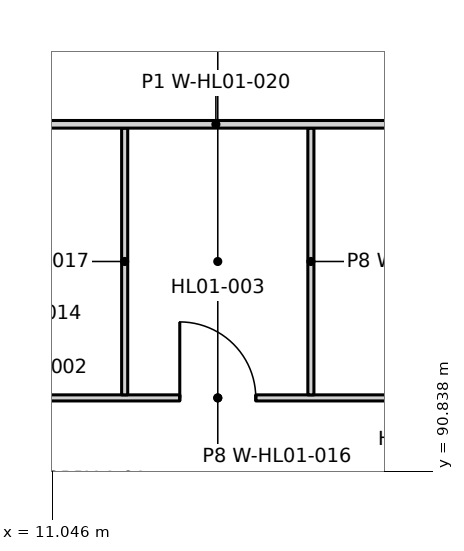
"""IFC4 building model, lengths in metres.
Left out: names, types, materials, properties, quantities, classifications, styles, units other than length and angle.
Written with IfcOpenShell. Run it as: python <this file> out.ifc"""

import sys

from ifc_helpers import new_model, si_unit, direction, frame, frame_2d, origin, place, context, subcontext, project, spatial, rectangle, extrude, element, fill, save


model = new_model("IFC4")
c1 = context("Model", 3, precision=1e-05, world=origin(), true_north=direction((0.0, 1.0)))
c2 = subcontext(c1, "Body", "Model", "MODEL_VIEW")
j1 = project(units=[si_unit("LENGTHUNIT", "METRE"), si_unit("PLANEANGLEUNIT", "RADIAN")], contexts=[c1])
p1 = place(None, origin())
s1 = spatial("IfcSite", under=j1, at=p1, CompositionType="ELEMENT")
p2 = place(p1, origin())
s2 = spatial("IfcBuilding", under=s1, at=p2, CompositionType="ELEMENT")
p3 = place(p2, frame((0.0, 0.0, 6.0)))
s3 = spatial("IfcBuildingStorey", under=s2, at=p3, CompositionType="ELEMENT", Elevation=6.0)
p4 = place(p3, frame((9.05, 91.8, 0.0), z_axis=(0.0, 0.0, 1.0), x_axis=(1.0, 0.0, 0.0)))
e1 = element("IfcWall", 1, at=p4, inside=s3, PredefinedType="PARTITIONING", context=c2, shape_type="SweptSolid", body=[
    extrude(rectangle(XDim=8.35, YDim=0.08, at=frame_2d((4.175, 0.0))), origin(), (0.0, 0.0, 1.0), 4.2),
])
p5 = place(p4, frame((0.95, 0.0, 0.0)))
e2 = element("IfcOpeningElement", 2, at=p5, cuts=e1, PredefinedType="OPENING", context=c2, shape_type="SweptSolid", body=[
    extrude(rectangle(XDim=1.0, YDim=2.1, at=frame_2d((0.5, 1.05))), frame((0.0, 0.05, 0.0), z_axis=(0.0, -1.0, 0.0), x_axis=(1.0, 0.0, 0.0)), (0.0, 0.0, 1.0), 0.1),
])
p6 = place(p4, frame((3.675, 0.0, 0.0)))
e3 = element("IfcOpeningElement", 3, at=p6, cuts=e1, PredefinedType="OPENING", context=c2, shape_type="SweptSolid", body=[
    extrude(rectangle(XDim=1.0, YDim=2.1, at=frame_2d((0.5, 1.05))), frame((0.0, 0.05, 0.0), z_axis=(0.0, -1.0, 0.0), x_axis=(1.0, 0.0, 0.0)), (0.0, 0.0, 1.0), 0.1),
])
p7 = place(p4, frame((6.4, 0.0, 0.0)))
e4 = element("IfcOpeningElement", 4, at=p7, cuts=e1, PredefinedType="OPENING", context=c2, shape_type="SweptSolid", body=[
    extrude(rectangle(XDim=1.0, YDim=2.1, at=frame_2d((0.5, 1.05))), frame((0.0, 0.05, 0.0), z_axis=(0.0, -1.0, 0.0), x_axis=(1.0, 0.0, 0.0)), (0.0, 0.0, 1.0), 0.1),
])
for number, where, z_axis, x_axis in (
    (5, (12.0, 91.84, 0.0), (0.0, 0.0, 1.0), (0.0, 1.0, 0.0)),
    (6, (14.45, 91.84, 0.0), (0.0, 0.0, 1.0), (0.0, 1.0, 0.0)),
):
    element("IfcWall", number, at=place(p3, frame(where, z_axis=z_axis, x_axis=x_axis)), inside=s3, PredefinedType="PARTITIONING", context=c2, shape_type="SweptSolid", body=[
        extrude(rectangle(XDim=3.51, YDim=0.08, at=frame_2d((1.755, 0.0))), origin(), (0.0, 0.0, 1.0), 4.2),
    ])
p8 = place(p3, frame((8.95, 95.4, 0.0), z_axis=(0.0, 0.0, 1.0), x_axis=(1.0, 0.0, 0.0)))
e7 = element("IfcWall", 7, at=p8, inside=s3, PredefinedType="PARTITIONING", context=c2, shape_type="SweptSolid", body=[
    extrude(rectangle(XDim=8.5, YDim=0.1, at=frame_2d((4.25, 0.0))), origin(), (0.0, 0.0, 1.0), 4.2),
])
p9 = place(p6, origin())
e8 = element("IfcDoor", 8, at=p9, inside=s3, OperationType="SINGLE_SWING_LEFT", PredefinedType="DOOR", context=c2, shape_type="SweptSolid", body=[
    extrude(rectangle(XDim=1.0, YDim=2.1, at=frame_2d((0.5, 1.05))), frame((0.0, 0.025, 0.0), z_axis=(0.0, -1.0, 0.0), x_axis=(1.0, 0.0, 0.0)), (0.0, 0.0, 1.0), 0.05),
])
fill(e3, e8)
save(model, sys.argv[1])
